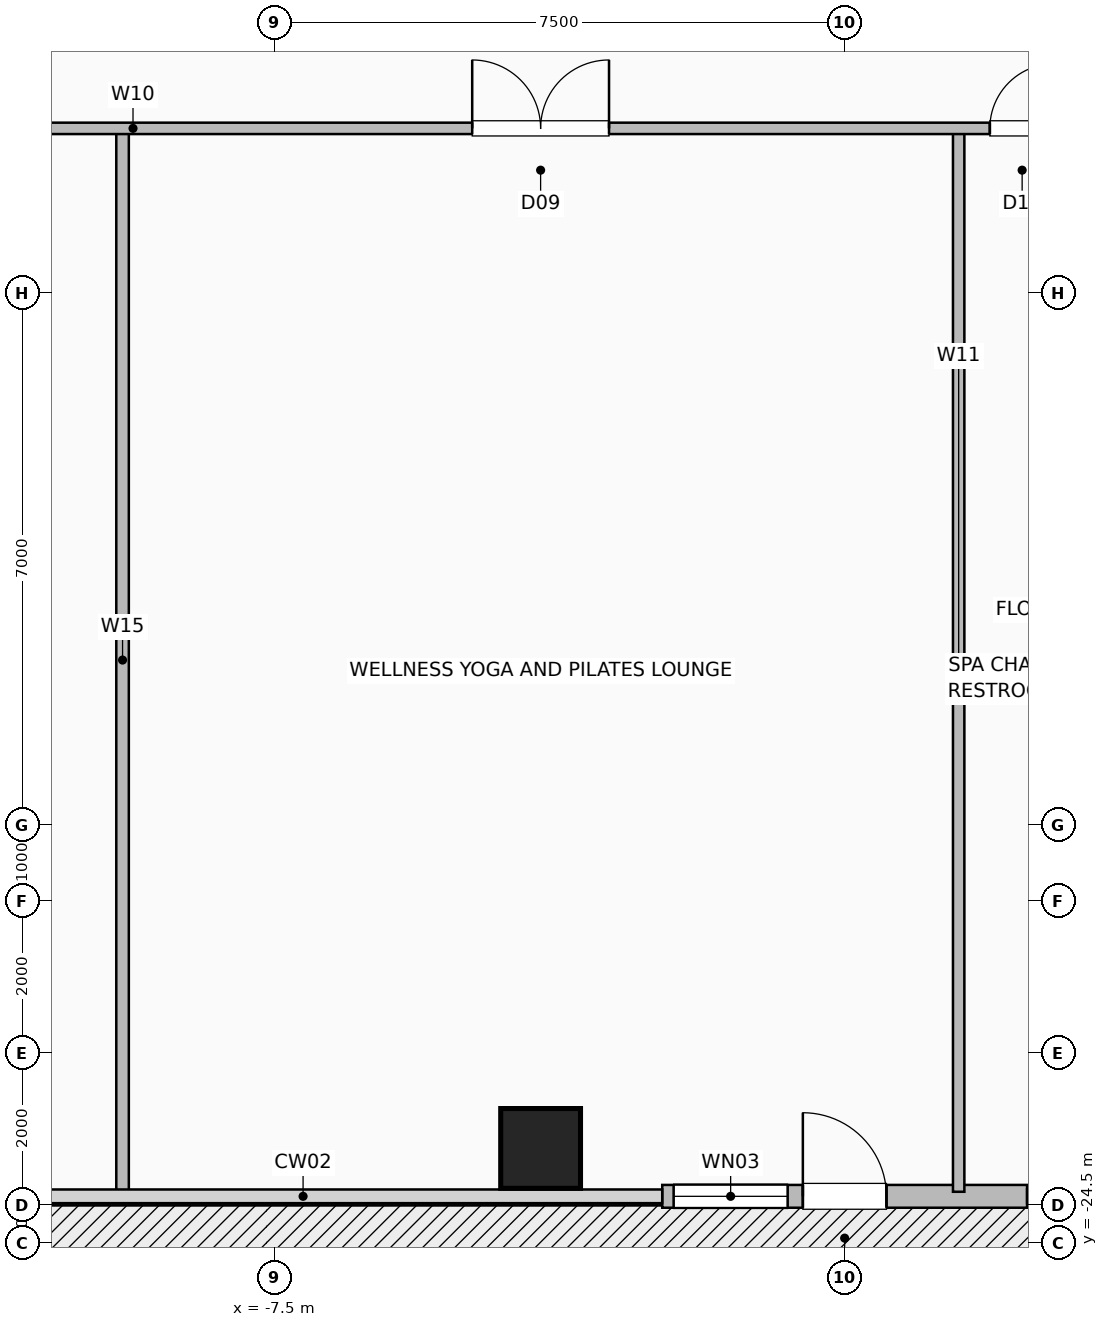
"""IFC4 building model, lengths in metres.
Left out: names, types, materials, properties, quantities, classifications, styles, units other than length and angle.
Written with IfcOpenShell. Run it as: python <this file> out.ifc"""

import sys

from ifc_helpers import new_model, si_unit, direction, frame, frame_2d, origin, origin_2d, place, context, subcontext, project, spatial, rectangle, hollow_rectangle, extrude, element, fill, save


model = new_model("IFC4")
c1 = context("Model", 3, precision=1e-05, world=origin(), true_north=direction((0.0, 1.0)))
c2 = subcontext(c1, "Body", "Model", "MODEL_VIEW")
j1 = project(units=[si_unit("LENGTHUNIT", "METRE"), si_unit("PLANEANGLEUNIT", "RADIAN")], contexts=[c1])
p1 = place(None, origin())
s1 = spatial("IfcSite", under=j1, at=p1, CompositionType="ELEMENT")
p2 = place(p1, origin())
s2 = spatial("IfcBuilding", under=s1, at=p2, CompositionType="ELEMENT")
p3 = place(p2, frame((0.0, 0.0, 55.0)))
s3 = spatial("IfcBuildingStorey", under=s2, at=p3, CompositionType="ELEMENT", Elevation=55.0)
p4 = place(p3, frame((-4.0, -23.25, 0.0), z_axis=(0.0, 0.0, 1.0), x_axis=(1.0, 0.0, 0.0)))
e1 = element("IfcColumn", 1, at=p4, inside=s3, PredefinedType="COLUMN", context=c2, shape_type="SweptSolid", body=[
    extrude(hollow_rectangle(XDim=1.05, YDim=1.05, WallThickness=0.05, at=origin_2d()), origin(), (0.0, 0.0, 1.0), 3.5),
])
p5 = place(p3, frame((-2.4, -23.88, 0.0), z_axis=(0.0, 0.0, 1.0), x_axis=(1.0, 0.0, 0.0)))
e2 = element("IfcWall", 2, at=p5, inside=s3, PredefinedType="SOLIDWALL", context=c2, shape_type="SweptSolid", body=[
    extrude(rectangle(XDim=4.8, YDim=0.3, at=frame_2d((2.4, 0.0))), origin(), (0.0, 0.0, 1.0), 3.25),
])
p6 = place(p5, frame((1.85, 0.0, 0.0)))
e3 = element("IfcOpeningElement", 3, at=p6, cuts=e2, PredefinedType="OPENING", context=c2, shape_type="SweptSolid", body=[
    extrude(rectangle(XDim=1.1, YDim=2.2, at=frame_2d((0.55, 1.1))), frame((0.0, 0.16, 0.0), z_axis=(0.0, -1.0, 0.0), x_axis=(1.0, 0.0, 0.0)), (0.0, 0.0, 1.0), 0.32),
])
p7 = place(p5, frame((0.15, 0.0, 0.85)))
e4 = element("IfcOpeningElement", 4, at=p7, cuts=e2, PredefinedType="OPENING", context=c2, shape_type="SweptSolid", body=[
    extrude(rectangle(XDim=1.5, YDim=1.8, at=frame_2d((0.75, 0.9))), frame((0.0, 0.16, 0.0), z_axis=(0.0, -1.0, 0.0), x_axis=(1.0, 0.0, 0.0)), (0.0, 0.0, 1.0), 0.32),
])
p8 = place(p3, frame((-9.5, -23.82, 0.0), z_axis=(0.0, 0.0, 1.0), x_axis=(0.0, 1.0, 0.0)))
e5 = element("IfcWall", 5, at=p8, inside=s3, PredefinedType="PLUMBINGWALL", context=c2, shape_type="SweptSolid", body=[
    extrude(rectangle(XDim=13.99, YDim=0.165, at=frame_2d((6.995, 0.0))), origin(), (0.0, 0.0, 1.0), 3.25),
])
p9 = place(p3, frame((1.5, -23.82, 0.0), z_axis=(0.0, 0.0, 1.0), x_axis=(0.0, 1.0, 0.0)))
e6 = element("IfcWall", 6, at=p9, inside=s3, PredefinedType="PARTITIONING", context=c2, shape_type="SweptSolid", body=[
    extrude(rectangle(XDim=13.99, YDim=0.15, at=frame_2d((6.995, 0.0))), origin(), (0.0, 0.0, 1.0), 3.25),
])
p10 = place(p3, frame((-20.07, -9.83, 0.0), z_axis=(0.0, 0.0, 1.0), x_axis=(1.0, 0.0, 0.0)))
e7 = element("IfcWall", 7, at=p10, inside=s3, PredefinedType="PARTITIONING", context=c2, shape_type="SweptSolid", body=[
    extrude(rectangle(XDim=40.14, YDim=0.15, at=frame_2d((20.07, 0.0))), origin(), (0.0, 0.0, 1.0), 3.25),
])
p11 = place(p10, frame((4.445, 0.0, 0.0)))
e8 = element("IfcOpeningElement", 8, at=p11, cuts=e7, PredefinedType="OPENING", context=c2, shape_type="SweptSolid", body=[
    extrude(rectangle(XDim=1.8, YDim=2.08, at=frame_2d((0.9, 1.04))), frame((0.0, 0.085, 0.0), z_axis=(0.0, -1.0, 0.0), x_axis=(1.0, 0.0, 0.0)), (0.0, 0.0, 1.0), 0.17),
])
p12 = place(p10, frame((15.17, 0.0, 0.0)))
e9 = element("IfcOpeningElement", 9, at=p12, cuts=e7, PredefinedType="OPENING", context=c2, shape_type="SweptSolid", body=[
    extrude(rectangle(XDim=1.8, YDim=2.08, at=frame_2d((0.9, 1.04))), frame((0.0, 0.085, 0.0), z_axis=(0.0, -1.0, 0.0), x_axis=(1.0, 0.0, 0.0)), (0.0, 0.0, 1.0), 0.17),
])
p13 = place(p10, frame((21.98, 0.0, 0.0)))
e10 = element("IfcOpeningElement", 10, at=p13, cuts=e7, PredefinedType="OPENING", context=c2, shape_type="SweptSolid", body=[
    extrude(rectangle(XDim=0.85, YDim=2.05, at=frame_2d((0.425, 1.025))), frame((0.0, 0.085, 0.0), z_axis=(0.0, -1.0, 0.0), x_axis=(1.0, 0.0, 0.0)), (0.0, 0.0, 1.0), 0.17),
])
p14 = place(p10, frame((23.78, 0.0, 0.0)))
e11 = element("IfcOpeningElement", 11, at=p14, cuts=e7, PredefinedType="OPENING", context=c2, shape_type="SweptSolid", body=[
    extrude(rectangle(XDim=0.95, YDim=2.06, at=frame_2d((0.475, 1.03))), frame((0.0, 0.085, 0.0), z_axis=(0.0, -1.0, 0.0), x_axis=(1.0, 0.0, 0.0)), (0.0, 0.0, 1.0), 0.17),
])
p15 = place(p10, frame((25.845, 0.0, 0.0)))
e12 = element("IfcOpeningElement", 12, at=p15, cuts=e7, PredefinedType="OPENING", context=c2, shape_type="SweptSolid", body=[
    extrude(rectangle(XDim=0.85, YDim=2.05, at=frame_2d((0.425, 1.025))), frame((0.0, 0.085, 0.0), z_axis=(0.0, -1.0, 0.0), x_axis=(1.0, 0.0, 0.0)), (0.0, 0.0, 1.0), 0.17),
])
p16 = place(p10, frame((32.745, 0.0, 0.0)))
e13 = element("IfcOpeningElement", 13, at=p16, cuts=e7, PredefinedType="OPENING", context=c2, shape_type="SweptSolid", body=[
    extrude(rectangle(XDim=1.8, YDim=2.08, at=frame_2d((0.9, 1.04))), frame((0.0, 0.085, 0.0), z_axis=(0.0, -1.0, 0.0), x_axis=(1.0, 0.0, 0.0)), (0.0, 0.0, 1.0), 0.17),
])
p17 = place(p6, origin())
e14 = element("IfcDoor", 14, at=p17, inside=s3, OperationType="SINGLE_SWING_LEFT", PredefinedType="DOOR", context=c2, shape_type="SweptSolid", body=[
    extrude(rectangle(XDim=1.1, YDim=2.2, at=frame_2d((0.55, 1.1))), frame((0.0, 0.025, 0.0), z_axis=(0.0, -1.0, 0.0), x_axis=(1.0, 0.0, 0.0)), (0.0, 0.0, 1.0), 0.05),
])
fill(e3, e14)
p18 = place(p7, origin())
e15 = element("IfcWindow", 15, at=p18, inside=s3, PartitioningType="SINGLE_PANEL", PredefinedType="WINDOW", context=c2, shape_type="SweptSolid", body=[
    extrude(rectangle(XDim=1.5, YDim=1.8, at=frame_2d((0.75, 0.9))), frame((0.0, 0.03, 0.0), z_axis=(0.0, -1.0, 0.0), x_axis=(1.0, 0.0, 0.0)), (0.0, 0.0, 1.0), 0.06),
])
fill(e4, e15)
p19 = place(p12, origin())
e16 = element("IfcDoor", 16, at=p19, inside=s3, OperationType="DOUBLE_DOOR_SINGLE_SWING", PredefinedType="DOOR", context=c2, shape_type="SweptSolid", body=[
    extrude(rectangle(XDim=1.8, YDim=2.08, at=frame_2d((0.9, 1.04))), frame((0.0, 0.025, 0.0), z_axis=(0.0, -1.0, 0.0), x_axis=(1.0, 0.0, 0.0)), (0.0, 0.0, 1.0), 0.05),
])
fill(e9, e16)
p20 = place(p13, origin())
e17 = element("IfcDoor", 17, at=p20, inside=s3, OperationType="SINGLE_SWING_RIGHT", PredefinedType="DOOR", context=c2, shape_type="SweptSolid", body=[
    extrude(rectangle(XDim=0.85, YDim=2.05, at=frame_2d((0.425, 1.025))), frame((0.0, 0.025, 0.0), z_axis=(0.0, -1.0, 0.0), x_axis=(1.0, 0.0, 0.0)), (0.0, 0.0, 1.0), 0.05),
])
fill(e10, e17)
save(model, sys.argv[1])
